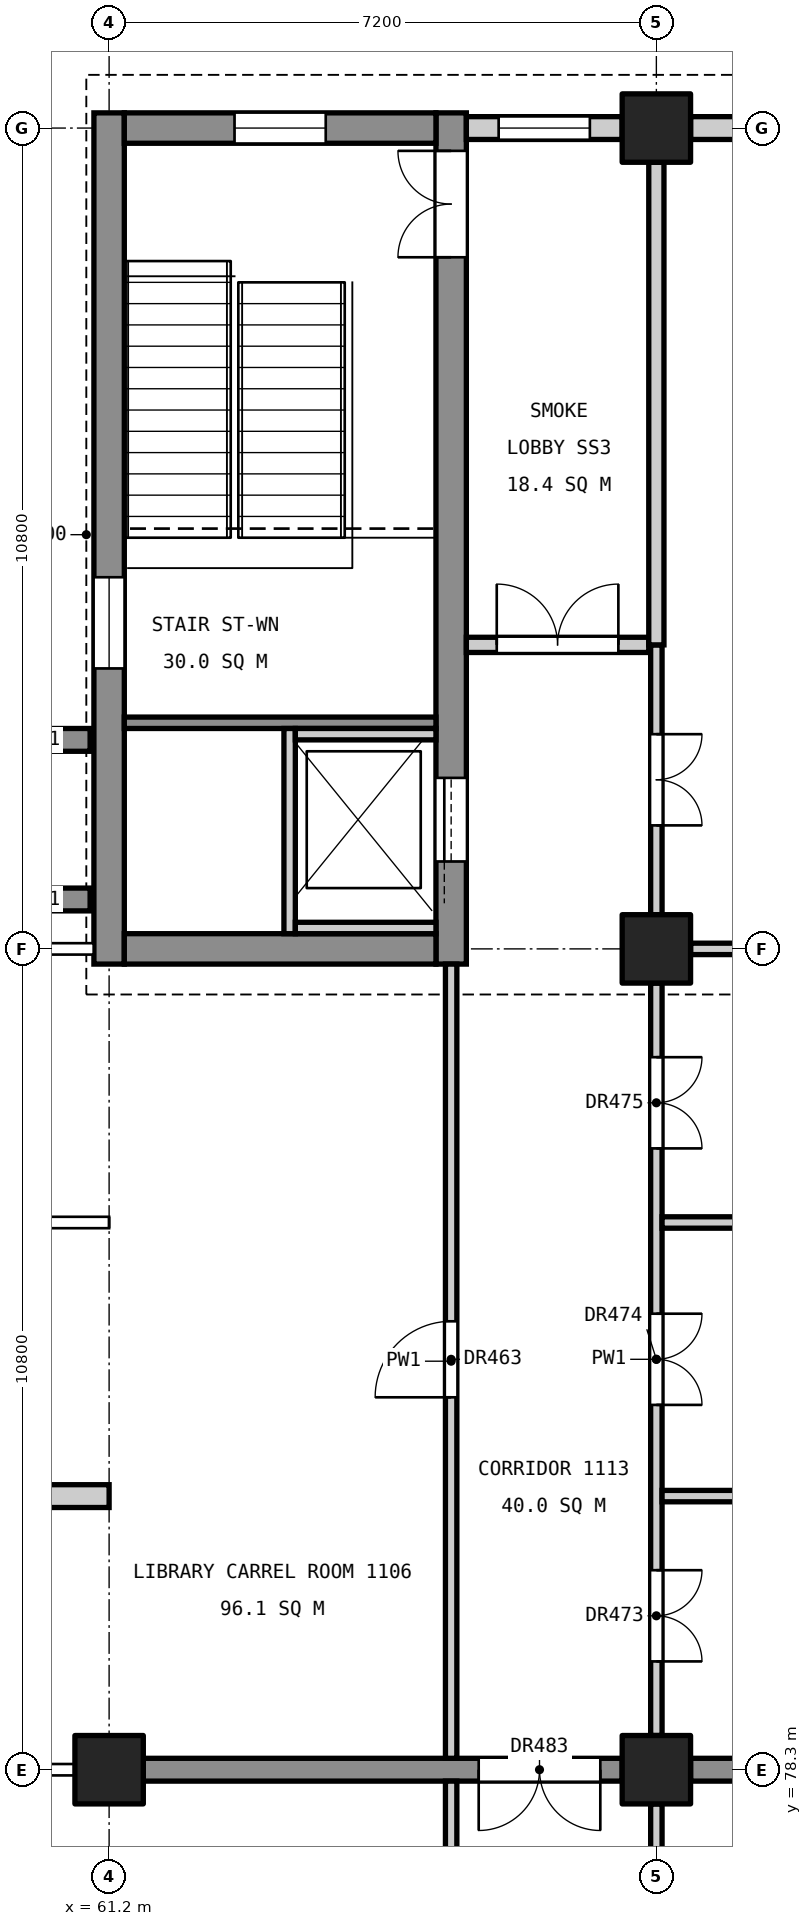
"""IFC4 building model, lengths in metres.
Left out: names, types, materials, properties, quantities, classifications, styles, units other than length and angle.
Written with IfcOpenShell. Run it as: python <this file> out.ifc"""

import sys

from ifc_helpers import new_model, si_unit, direction, frame, frame_2d, origin, origin_2d, place, context, subcontext, project, spatial, rectangle, extrude, element, fill, save


model = new_model("IFC4")
c1 = context("Model", 3, precision=1e-05, world=origin(), true_north=direction((0.0, 1.0)))
c2 = subcontext(c1, "Body", "Model", "MODEL_VIEW")
j1 = project(units=[si_unit("LENGTHUNIT", "METRE"), si_unit("PLANEANGLEUNIT", "RADIAN")], contexts=[c1])
p1 = place(None, origin())
s1 = spatial("IfcSite", under=j1, at=p1, CompositionType="ELEMENT")
p2 = place(p1, origin())
s2 = spatial("IfcBuilding", under=s1, at=p2, CompositionType="ELEMENT")
p3 = place(p2, frame((0.0, 0.0, 55.8)))
s3 = spatial("IfcBuildingStorey", under=s2, at=p3, CompositionType="ELEMENT", Elevation=55.8)
for number, where, z_axis, x_axis in (
    (1, (61.2, 78.3, 0.0), (0.0, 0.0, 1.0), (1.0, 0.0, 0.0)),
    (2, (68.4, 78.3, 0.0), (0.0, 0.0, 1.0), (1.0, 0.0, 0.0)),
    (3, (68.4, 89.1, 0.0), (0.0, 0.0, 1.0), (1.0, 0.0, 0.0)),
    (4, (68.4, 99.9, 0.0), (0.0, 0.0, 1.0), (1.0, 0.0, 0.0)),
):
    element("IfcColumn", number, at=place(p3, frame(where, z_axis=z_axis, x_axis=x_axis)), inside=s3, PredefinedType="COLUMN", context=c2, shape_type="SweptSolid", body=[
        extrude(rectangle(XDim=0.9, YDim=0.9, at=origin_2d()), origin(), (0.0, 0.0, 1.0), 4.8),
    ])
p4 = place(p3, frame((61.2, 88.9, 0.0), z_axis=(0.0, 0.0, 1.0), x_axis=(0.0, 1.0, 0.0)))
e5 = element("IfcWall", 5, at=p4, inside=s3, PredefinedType="SHEAR", context=c2, shape_type="SweptSolid", body=[
    extrude(rectangle(XDim=11.2, YDim=0.4, at=frame_2d((5.6, 0.0))), origin(), (0.0, 0.0, 1.0), 4.55),
])
p5 = place(p4, frame((3.89, 0.0, 3.4)))
e6 = element("IfcOpeningElement", 6, at=p5, cuts=e5, PredefinedType="OPENING", context=c2, shape_type="SweptSolid", body=[
    extrude(rectangle(XDim=1.2, YDim=0.9, at=frame_2d((0.6, 0.45))), frame((0.0, 0.21, 0.0), z_axis=(0.0, -1.0, 0.0), x_axis=(1.0, 0.0, 0.0)), (0.0, 0.0, 1.0), 0.42),
])
p6 = place(p3, frame((65.7, 88.9, 0.0), z_axis=(0.0, 0.0, 1.0), x_axis=(0.0, 1.0, 0.0)))
e7 = element("IfcWall", 7, at=p6, inside=s3, PredefinedType="SHEAR", context=c2, shape_type="SweptSolid", body=[
    extrude(rectangle(XDim=11.2, YDim=0.4, at=frame_2d((5.6, 0.0))), origin(), (0.0, 0.0, 1.0), 4.55),
])
p7 = place(p6, frame((9.3, 0.0, 0.0)))
e8 = element("IfcOpeningElement", 8, at=p7, cuts=e7, PredefinedType="OPENING", context=c2, shape_type="SweptSolid", body=[
    extrude(rectangle(XDim=1.4, YDim=2.1, at=frame_2d((0.7, 1.05))), frame((0.0, 0.21, 0.0), z_axis=(0.0, -1.0, 0.0), x_axis=(1.0, 0.0, 0.0)), (0.0, 0.0, 1.0), 0.42),
])
p8 = place(p6, frame((1.35, 0.0, 0.0)))
e9 = element("IfcOpeningElement", 9, at=p8, cuts=e7, PredefinedType="OPENING", context=c2, shape_type="SweptSolid", body=[
    extrude(rectangle(XDim=1.1, YDim=2.1, at=frame_2d((0.55, 1.05))), frame((0.0, 0.21, 0.0), z_axis=(0.0, -1.0, 0.0), x_axis=(1.0, 0.0, 0.0)), (0.0, 0.0, 1.0), 0.42),
])
p9 = place(p3, frame((61.4, 89.1, 0.0), z_axis=(0.0, 0.0, 1.0), x_axis=(1.0, 0.0, 0.0)))
e10 = element("IfcWall", 10, at=p9, inside=s3, PredefinedType="SHEAR", context=c2, shape_type="SweptSolid", body=[
    extrude(rectangle(XDim=4.1, YDim=0.4, at=frame_2d((2.05, 0.0))), origin(), (0.0, 0.0, 1.0), 4.55),
])
p10 = place(p3, frame((61.4, 99.9, 0.0), z_axis=(0.0, 0.0, 1.0), x_axis=(1.0, 0.0, 0.0)))
e11 = element("IfcWall", 11, at=p10, inside=s3, PredefinedType="SHEAR", context=c2, shape_type="SweptSolid", body=[
    extrude(rectangle(XDim=4.1, YDim=0.4, at=frame_2d((2.05, 0.0))), origin(), (0.0, 0.0, 1.0), 4.55),
])
p11 = place(p10, frame((1.45, 0.0, 3.4)))
e12 = element("IfcOpeningElement", 12, at=p11, cuts=e11, PredefinedType="OPENING", context=c2, shape_type="SweptSolid", body=[
    extrude(rectangle(XDim=1.2, YDim=0.9, at=frame_2d((0.6, 0.45))), frame((0.0, 0.21, 0.0), z_axis=(0.0, -1.0, 0.0), x_axis=(1.0, 0.0, 0.0)), (0.0, 0.0, 1.0), 0.42),
])
for number, where, z_axis, x_axis in (
    (13, (60.95, 89.75, 0.0), (0.0, 0.0, 1.0), (-1.0, 0.0, 0.0)),
    (14, (60.95, 91.85, 0.0), (0.0, 0.0, 1.0), (-1.0, 0.0, 0.0)),
):
    element("IfcWall", number, at=place(p3, frame(where, z_axis=z_axis, x_axis=x_axis)), inside=s3, PredefinedType="SHEAR", context=c2, shape_type="SweptSolid", body=[
        extrude(rectangle(XDim=1.25, YDim=0.3, at=frame_2d((0.625, 0.0))), origin(), (0.0, 0.0, 1.0), 4.8),
    ])
p12 = place(p3, frame((61.65, 78.3, 0.0), z_axis=(0.0, 0.0, 1.0), x_axis=(1.0, 0.0, 0.0)))
e15 = element("IfcWall", 15, at=p12, inside=s3, PredefinedType="SHEAR", context=c2, shape_type="SweptSolid", body=[
    extrude(rectangle(XDim=6.3, YDim=0.3, at=frame_2d((3.15, 0.0))), origin(), (0.0, 0.0, 1.0), 4.55),
])
p13 = place(p12, frame((4.413, 0.0, 0.0)))
e16 = element("IfcOpeningElement", 16, at=p13, cuts=e15, PredefinedType="OPENING", context=c2, shape_type="SweptSolid", body=[
    extrude(rectangle(XDim=1.6, YDim=2.1, at=frame_2d((0.8, 1.05))), frame((0.0, 0.16, 0.0), z_axis=(0.0, -1.0, 0.0), x_axis=(1.0, 0.0, 0.0)), (0.0, 0.0, 1.0), 0.32),
])
p14 = place(p3, frame((68.85, 78.3, 0.0), z_axis=(0.0, 0.0, 1.0), x_axis=(1.0, 0.0, 0.0)))
e17 = element("IfcWall", 17, at=p14, inside=s3, PredefinedType="SHEAR", context=c2, shape_type="SweptSolid", body=[
    extrude(rectangle(XDim=9.9, YDim=0.3, at=frame_2d((4.95, 0.0))), origin(), (0.0, 0.0, 1.0), 4.55),
])
p15 = place(p3, frame((61.4, 92.075, 0.0), z_axis=(0.0, 0.0, 1.0), x_axis=(1.0, 0.0, 0.0)))
e18 = element("IfcWall", 18, at=p15, inside=s3, PredefinedType="SOLIDWALL", context=c2, shape_type="SweptSolid", body=[
    extrude(rectangle(XDim=4.1, YDim=0.15, at=frame_2d((2.05, 0.0))), origin(), (0.0, 0.0, 1.0), 4.55),
])
p16 = place(p3, frame((63.575, 92.0, 0.0), z_axis=(0.0, 0.0, 1.0), x_axis=(0.0, -1.0, 0.0)))
e19 = element("IfcWall", 19, at=p16, inside=s3, PredefinedType="SOLIDWALL", context=c2, shape_type="SweptSolid", body=[
    extrude(rectangle(XDim=2.7, YDim=0.15, at=frame_2d((1.35, 0.0))), origin(), (0.0, 0.0, 1.0), 4.8),
])
for number, where, z_axis, x_axis in (
    (20, (63.65, 91.925, 0.0), (0.0, 0.0, 1.0), (1.0, 0.0, 0.0)),
    (21, (63.65, 89.375, 0.0), (0.0, 0.0, 1.0), (1.0, 0.0, 0.0)),
):
    element("IfcWall", number, at=place(p3, frame(where, z_axis=z_axis, x_axis=x_axis)), inside=s3, PredefinedType="SOLIDWALL", context=c2, shape_type="SweptSolid", body=[
        extrude(rectangle(XDim=1.85, YDim=0.15, at=frame_2d((0.925, 0.0))), origin(), (0.0, 0.0, 1.0), 4.8),
    ])
p17 = place(p3, frame((65.9, 99.9, 0.0), z_axis=(0.0, 0.0, 1.0), x_axis=(1.0, 0.0, 0.0)))
e22 = element("IfcWall", 22, at=p17, inside=s3, PredefinedType="STANDARD", context=c2, shape_type="SweptSolid", body=[
    extrude(rectangle(XDim=2.05, YDim=0.3, at=frame_2d((1.025, 0.0))), origin(), (0.0, 0.0, 1.0), 3.85),
])
p18 = place(p17, frame((0.425, 0.0, 0.9)))
e23 = element("IfcOpeningElement", 23, at=p18, cuts=e22, PredefinedType="OPENING", context=c2, shape_type="SweptSolid", body=[
    extrude(rectangle(XDim=1.2, YDim=2.4, at=frame_2d((0.6, 1.2))), frame((0.0, 0.16, 0.0), z_axis=(0.0, -1.0, 0.0), x_axis=(1.0, 0.0, 0.0)), (0.0, 0.0, 1.0), 0.32),
])
p19 = place(p3, frame((68.85, 99.9, 0.0), z_axis=(0.0, 0.0, 1.0), x_axis=(1.0, 0.0, 0.0)))
e24 = element("IfcWall", 24, at=p19, inside=s3, PredefinedType="STANDARD", context=c2, shape_type="SweptSolid", body=[
    extrude(rectangle(XDim=9.9, YDim=0.3, at=frame_2d((4.95, 0.0))), origin(), (0.0, 0.0, 1.0), 3.85),
])
p20 = place(p19, frame((0.675, 0.0, 0.9)))
e25 = element("IfcOpeningElement", 25, at=p20, cuts=e24, PredefinedType="OPENING", context=c2, shape_type="SweptSolid", body=[
    extrude(rectangle(XDim=1.8, YDim=2.4, at=frame_2d((0.9, 1.2))), frame((0.0, 0.16, 0.0), z_axis=(0.0, -1.0, 0.0), x_axis=(1.0, 0.0, 0.0)), (0.0, 0.0, 1.0), 0.32),
])
p21 = place(p19, frame((4.575, 0.0, 0.8)))
e26 = element("IfcOpeningElement", 26, at=p21, cuts=e24, PredefinedType="OPENING", context=c2, shape_type="SweptSolid", body=[
    extrude(rectangle(XDim=0.75, YDim=1.2, at=frame_2d((0.375, 0.6))), frame((0.0, 0.16, 0.0), z_axis=(0.0, -1.0, 0.0), x_axis=(1.0, 0.0, 0.0)), (0.0, 0.0, 1.0), 0.32),
])
p22 = place(p19, frame((7.425, 0.0, 0.9)))
e27 = element("IfcOpeningElement", 27, at=p22, cuts=e24, PredefinedType="OPENING", context=c2, shape_type="SweptSolid", body=[
    extrude(rectangle(XDim=1.8, YDim=2.4, at=frame_2d((0.9, 1.2))), frame((0.0, 0.16, 0.0), z_axis=(0.0, -1.0, 0.0), x_axis=(1.0, 0.0, 0.0)), (0.0, 0.0, 1.0), 0.32),
])
p23 = place(p3, frame((56.4, 81.9, 0.0), z_axis=(0.0, 0.0, 1.0), x_axis=(1.0, 0.0, 0.0)))
e28 = element("IfcWall", 28, at=p23, inside=s3, PredefinedType="STANDARD", context=c2, shape_type="SweptSolid", body=[
    extrude(rectangle(XDim=4.8, YDim=0.3, at=frame_2d((2.4, 0.0))), origin(), (0.0, 0.0, 1.0), 3.65),
])
p24 = place(p3, frame((65.7, 74.9, 0.0), z_axis=(0.0, 0.0, 1.0), x_axis=(0.0, 1.0, 0.0)))
e29 = element("IfcWall", 29, at=p24, inside=s3, PredefinedType="PARTITIONING", context=c2, shape_type="SweptSolid", body=[
    extrude(rectangle(XDim=3.25, YDim=0.15, at=frame_2d((1.625, 0.0))), origin(), (0.0, 0.0, 1.0), 3.55),
])
p25 = place(p24, frame((1.1, 0.0, 0.0)))
e30 = element("IfcOpeningElement", 30, at=p25, cuts=e29, PredefinedType="OPENING", context=c2, shape_type="SweptSolid", body=[
    extrude(rectangle(XDim=1.0, YDim=2.1, at=frame_2d((0.5, 1.05))), frame((0.0, 0.085, 0.0), z_axis=(0.0, -1.0, 0.0), x_axis=(1.0, 0.0, 0.0)), (0.0, 0.0, 1.0), 0.17),
])
p26 = place(p3, frame((65.7, 78.45, 0.0), z_axis=(0.0, 0.0, 1.0), x_axis=(0.0, 1.0, 0.0)))
e31 = element("IfcWall", 31, at=p26, inside=s3, PredefinedType="PARTITIONING", context=c2, shape_type="SweptSolid", body=[
    extrude(rectangle(XDim=10.45, YDim=0.15, at=frame_2d((5.225, 0.0))), origin(), (0.0, 0.0, 1.0), 3.55),
])
p27 = place(p26, frame((4.75, 0.0, 0.0)))
e32 = element("IfcOpeningElement", 32, at=p27, cuts=e31, PredefinedType="OPENING", context=c2, shape_type="SweptSolid", body=[
    extrude(rectangle(XDim=1.0, YDim=2.1, at=frame_2d((0.5, 1.05))), frame((0.0, 0.085, 0.0), z_axis=(0.0, -1.0, 0.0), x_axis=(1.0, 0.0, 0.0)), (0.0, 0.0, 1.0), 0.17),
])
p28 = place(p3, frame((65.9, 93.1, 0.0), z_axis=(0.0, 0.0, 1.0), x_axis=(1.0, 0.0, 0.0)))
e33 = element("IfcWall", 33, at=p28, inside=s3, PredefinedType="PARTITIONING", context=c2, shape_type="SweptSolid", body=[
    extrude(rectangle(XDim=2.4, YDim=0.2, at=frame_2d((1.2, 0.0))), origin(), (0.0, 0.0, 1.0), 3.55),
])
p29 = place(p28, frame((0.4, 0.0, 0.0)))
e34 = element("IfcOpeningElement", 34, at=p29, cuts=e33, PredefinedType="OPENING", context=c2, shape_type="SweptSolid", body=[
    extrude(rectangle(XDim=1.6, YDim=2.1, at=frame_2d((0.8, 1.05))), frame((0.0, 0.11, 0.0), z_axis=(0.0, -1.0, 0.0), x_axis=(1.0, 0.0, 0.0)), (0.0, 0.0, 1.0), 0.22),
])
p30 = place(p3, frame((68.4, 70.8, 0.0), z_axis=(0.0, 0.0, 1.0), x_axis=(0.0, 1.0, 0.0)))
e35 = element("IfcWall", 35, at=p30, inside=s3, PredefinedType="PARTITIONING", context=c2, shape_type="SweptSolid", body=[
    extrude(rectangle(XDim=7.05, YDim=0.15, at=frame_2d((3.525, 0.0))), origin(), (0.0, 0.0, 1.0), 3.55),
])
p31 = place(p30, frame((3.075, 0.0, 0.0)))
e36 = element("IfcOpeningElement", 36, at=p31, cuts=e35, PredefinedType="OPENING", context=c2, shape_type="SweptSolid", body=[
    extrude(rectangle(XDim=1.2, YDim=2.1, at=frame_2d((0.6, 1.05))), frame((0.0, 0.085, 0.0), z_axis=(0.0, -1.0, 0.0), x_axis=(1.0, 0.0, 0.0)), (0.0, 0.0, 1.0), 0.17),
])
p32 = place(p3, frame((68.4, 78.75, 0.0), z_axis=(0.0, 0.0, 1.0), x_axis=(0.0, 1.0, 0.0)))
e37 = element("IfcWall", 37, at=p32, inside=s3, PredefinedType="PARTITIONING", context=c2, shape_type="SweptSolid", body=[
    extrude(rectangle(XDim=9.9, YDim=0.15, at=frame_2d((4.95, 0.0))), origin(), (0.0, 0.0, 1.0), 3.55),
])
p33 = place(p32, frame((0.975, 0.0, 0.0)))
e38 = element("IfcOpeningElement", 38, at=p33, cuts=e37, PredefinedType="OPENING", context=c2, shape_type="SweptSolid", body=[
    extrude(rectangle(XDim=1.2, YDim=2.1, at=frame_2d((0.6, 1.05))), frame((0.0, 0.085, 0.0), z_axis=(0.0, -1.0, 0.0), x_axis=(1.0, 0.0, 0.0)), (0.0, 0.0, 1.0), 0.17),
])
p34 = place(p32, frame((4.35, 0.0, 0.0)))
e39 = element("IfcOpeningElement", 39, at=p34, cuts=e37, PredefinedType="OPENING", context=c2, shape_type="SweptSolid", body=[
    extrude(rectangle(XDim=1.2, YDim=2.1, at=frame_2d((0.6, 1.05))), frame((0.0, 0.085, 0.0), z_axis=(0.0, -1.0, 0.0), x_axis=(1.0, 0.0, 0.0)), (0.0, 0.0, 1.0), 0.17),
])
p35 = place(p32, frame((7.725, 0.0, 0.0)))
e40 = element("IfcOpeningElement", 40, at=p35, cuts=e37, PredefinedType="OPENING", context=c2, shape_type="SweptSolid", body=[
    extrude(rectangle(XDim=1.2, YDim=2.1, at=frame_2d((0.6, 1.05))), frame((0.0, 0.085, 0.0), z_axis=(0.0, -1.0, 0.0), x_axis=(1.0, 0.0, 0.0)), (0.0, 0.0, 1.0), 0.17),
])
p36 = place(p3, frame((68.4, 89.55, 0.0), z_axis=(0.0, 0.0, 1.0), x_axis=(0.0, 1.0, 0.0)))
e41 = element("IfcWall", 41, at=p36, inside=s3, PredefinedType="PARTITIONING", context=c2, shape_type="SweptSolid", body=[
    extrude(rectangle(XDim=3.55, YDim=0.15, at=frame_2d((1.775, 0.0))), origin(), (0.0, 0.0, 1.0), 3.55),
])
p37 = place(p36, frame((1.175, 0.0, 0.0)))
e42 = element("IfcOpeningElement", 42, at=p37, cuts=e41, PredefinedType="OPENING", context=c2, shape_type="SweptSolid", body=[
    extrude(rectangle(XDim=1.2, YDim=2.1, at=frame_2d((0.6, 1.05))), frame((0.0, 0.085, 0.0), z_axis=(0.0, -1.0, 0.0), x_axis=(1.0, 0.0, 0.0)), (0.0, 0.0, 1.0), 0.17),
])
p38 = place(p3, frame((68.4, 93.1, 0.0), z_axis=(0.0, 0.0, 1.0), x_axis=(0.0, 1.0, 0.0)))
e43 = element("IfcWall", 43, at=p38, inside=s3, PredefinedType="PARTITIONING", context=c2, shape_type="SweptSolid", body=[
    extrude(rectangle(XDim=6.35, YDim=0.2, at=frame_2d((3.175, 0.0))), origin(), (0.0, 0.0, 1.0), 3.55),
])
for number, where, z_axis, x_axis in (
    (44, (68.475, 81.9, 0.0), (0.0, 0.0, 1.0), (1.0, 0.0, 0.0)),
    (45, (68.475, 85.5, 0.0), (0.0, 0.0, 1.0), (1.0, 0.0, 0.0)),
):
    element("IfcWall", number, at=place(p3, frame(where, z_axis=z_axis, x_axis=x_axis)), inside=s3, PredefinedType="PARTITIONING", context=c2, shape_type="SweptSolid", body=[
        extrude(rectangle(XDim=10.575, YDim=0.15, at=frame_2d((5.288, 0.0))), origin(), (0.0, 0.0, 1.0), 3.85),
    ])
p39 = place(p3, frame((68.85, 89.1, 0.0), z_axis=(0.0, 0.0, 1.0), x_axis=(1.0, 0.0, 0.0)))
e46 = element("IfcWall", 46, at=p39, inside=s3, PredefinedType="PARTITIONING", context=c2, shape_type="SweptSolid", body=[
    extrude(rectangle(XDim=9.9, YDim=0.15, at=frame_2d((4.95, 0.0))), origin(), (0.0, 0.0, 1.0), 3.85),
])
p40 = place(p7, origin())
e47 = element("IfcDoor", 47, at=p40, inside=s3, OperationType="DOUBLE_DOOR_SINGLE_SWING", PredefinedType="DOOR", context=c2, shape_type="SweptSolid", body=[
    extrude(rectangle(XDim=1.4, YDim=2.1, at=frame_2d((0.7, 1.05))), frame((0.0, 0.025, 0.0), z_axis=(0.0, -1.0, 0.0), x_axis=(1.0, 0.0, 0.0)), (0.0, 0.0, 1.0), 0.05),
])
fill(e8, e47)
p41 = place(p8, origin())
e48 = element("IfcDoor", 48, at=p41, inside=s3, OperationType="SLIDING_TO_LEFT", PredefinedType="DOOR", context=c2, shape_type="SweptSolid", body=[
    extrude(rectangle(XDim=1.1, YDim=2.1, at=frame_2d((0.55, 1.05))), frame((0.0, 0.025, 0.0), z_axis=(0.0, -1.0, 0.0), x_axis=(1.0, 0.0, 0.0)), (0.0, 0.0, 1.0), 0.05),
])
fill(e9, e48)
p42 = place(p18, origin())
e49 = element("IfcWindow", 49, at=p42, inside=s3, PartitioningType="SINGLE_PANEL", PredefinedType="WINDOW", context=c2, shape_type="SweptSolid", body=[
    extrude(rectangle(XDim=1.2, YDim=2.4, at=frame_2d((0.6, 1.2))), frame((0.0, 0.03, 0.0), z_axis=(0.0, -1.0, 0.0), x_axis=(1.0, 0.0, 0.0)), (0.0, 0.0, 1.0), 0.06),
])
fill(e23, e49)
p43 = place(p5, origin())
e50 = element("IfcWindow", 50, at=p43, inside=s3, PartitioningType="SINGLE_PANEL", PredefinedType="WINDOW", context=c2, shape_type="SweptSolid", body=[
    extrude(rectangle(XDim=1.2, YDim=0.9, at=frame_2d((0.6, 0.45))), frame((0.0, 0.03, 0.0), z_axis=(0.0, -1.0, 0.0), x_axis=(1.0, 0.0, 0.0)), (0.0, 0.0, 1.0), 0.06),
])
fill(e6, e50)
p44 = place(p11, origin())
e51 = element("IfcWindow", 51, at=p44, inside=s3, PartitioningType="SINGLE_PANEL", PredefinedType="WINDOW", context=c2, shape_type="SweptSolid", body=[
    extrude(rectangle(XDim=1.2, YDim=0.9, at=frame_2d((0.6, 0.45))), frame((0.0, 0.03, 0.0), z_axis=(0.0, -1.0, 0.0), x_axis=(1.0, 0.0, 0.0)), (0.0, 0.0, 1.0), 0.06),
])
fill(e12, e51)
p45 = place(p27, origin())
e52 = element("IfcDoor", 52, at=p45, inside=s3, OperationType="SINGLE_SWING_LEFT", PredefinedType="DOOR", context=c2, shape_type="SweptSolid", body=[
    extrude(rectangle(XDim=1.0, YDim=2.1, at=frame_2d((0.5, 1.05))), frame((0.0, 0.025, 0.0), z_axis=(0.0, -1.0, 0.0), x_axis=(1.0, 0.0, 0.0)), (0.0, 0.0, 1.0), 0.05),
])
fill(e32, e52)
p46 = place(p33, frame((1.2, 0.0, 0.0), z_axis=(0.0, 0.0, 1.0), x_axis=(-1.0, 0.0, 0.0)))
e53 = element("IfcDoor", 53, at=p46, inside=s3, OperationType="DOUBLE_DOOR_SINGLE_SWING", PredefinedType="DOOR", context=c2, shape_type="SweptSolid", body=[
    extrude(rectangle(XDim=1.2, YDim=2.1, at=frame_2d((0.6, 1.05))), frame((0.0, 0.025, 0.0), z_axis=(0.0, -1.0, 0.0), x_axis=(1.0, 0.0, 0.0)), (0.0, 0.0, 1.0), 0.05),
])
fill(e38, e53)
p47 = place(p34, frame((1.2, 0.0, 0.0), z_axis=(0.0, 0.0, 1.0), x_axis=(-1.0, 0.0, 0.0)))
e54 = element("IfcDoor", 54, at=p47, inside=s3, OperationType="DOUBLE_DOOR_SINGLE_SWING", PredefinedType="DOOR", context=c2, shape_type="SweptSolid", body=[
    extrude(rectangle(XDim=1.2, YDim=2.1, at=frame_2d((0.6, 1.05))), frame((0.0, 0.025, 0.0), z_axis=(0.0, -1.0, 0.0), x_axis=(1.0, 0.0, 0.0)), (0.0, 0.0, 1.0), 0.05),
])
fill(e39, e54)
p48 = place(p35, frame((1.2, 0.0, 0.0), z_axis=(0.0, 0.0, 1.0), x_axis=(-1.0, 0.0, 0.0)))
e55 = element("IfcDoor", 55, at=p48, inside=s3, OperationType="DOUBLE_DOOR_SINGLE_SWING", PredefinedType="DOOR", context=c2, shape_type="SweptSolid", body=[
    extrude(rectangle(XDim=1.2, YDim=2.1, at=frame_2d((0.6, 1.05))), frame((0.0, 0.025, 0.0), z_axis=(0.0, -1.0, 0.0), x_axis=(1.0, 0.0, 0.0)), (0.0, 0.0, 1.0), 0.05),
])
fill(e40, e55)
p49 = place(p37, frame((1.2, 0.0, 0.0), z_axis=(0.0, 0.0, 1.0), x_axis=(-1.0, 0.0, 0.0)))
e56 = element("IfcDoor", 56, at=p49, inside=s3, OperationType="DOUBLE_DOOR_SINGLE_SWING", PredefinedType="DOOR", context=c2, shape_type="SweptSolid", body=[
    extrude(rectangle(XDim=1.2, YDim=2.1, at=frame_2d((0.6, 1.05))), frame((0.0, 0.025, 0.0), z_axis=(0.0, -1.0, 0.0), x_axis=(1.0, 0.0, 0.0)), (0.0, 0.0, 1.0), 0.05),
])
fill(e42, e56)
p50 = place(p29, origin())
e57 = element("IfcDoor", 57, at=p50, inside=s3, OperationType="DOUBLE_DOOR_SINGLE_SWING", PredefinedType="DOOR", context=c2, shape_type="SweptSolid", body=[
    extrude(rectangle(XDim=1.6, YDim=2.1, at=frame_2d((0.8, 1.05))), frame((0.0, 0.025, 0.0), z_axis=(0.0, -1.0, 0.0), x_axis=(1.0, 0.0, 0.0)), (0.0, 0.0, 1.0), 0.05),
])
fill(e34, e57)
p51 = place(p13, frame((1.6, 0.0, 0.0), z_axis=(0.0, 0.0, 1.0), x_axis=(-1.0, 0.0, 0.0)))
e58 = element("IfcDoor", 58, at=p51, inside=s3, OperationType="DOUBLE_DOOR_SINGLE_SWING", PredefinedType="DOOR", context=c2, shape_type="SweptSolid", body=[
    extrude(rectangle(XDim=1.6, YDim=2.1, at=frame_2d((0.8, 1.05))), frame((0.0, 0.025, 0.0), z_axis=(0.0, -1.0, 0.0), x_axis=(1.0, 0.0, 0.0)), (0.0, 0.0, 1.0), 0.05),
])
fill(e16, e58)
save(model, sys.argv[1])
